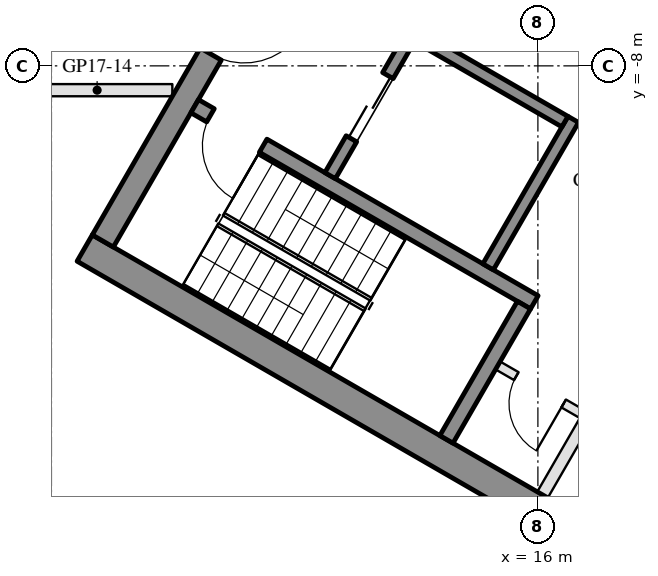
"""IFC4 building model, lengths in metres.
Left out: names, types, materials, properties, quantities, classifications, styles, units other than length and angle.
Written with IfcOpenShell. Run it as: python <this file> out.ifc"""

import sys

from ifc_helpers import new_model, si_unit, direction, frame, frame_2d, origin, place, context, subcontext, project, spatial, rectangle, extrude, element, fill, save


model = new_model("IFC4")
c1 = context("Model", 3, precision=1e-05, world=origin(), true_north=direction((0.0, 1.0)))
c2 = subcontext(c1, "Body", "Model", "MODEL_VIEW")
j1 = project(units=[si_unit("LENGTHUNIT", "METRE"), si_unit("PLANEANGLEUNIT", "RADIAN")], contexts=[c1])
p1 = place(None, origin())
s1 = spatial("IfcSite", under=j1, at=p1, CompositionType="ELEMENT")
p2 = place(p1, origin())
s2 = spatial("IfcBuilding", under=s1, at=p2, CompositionType="ELEMENT")
p3 = place(p2, frame((0.0, 0.0, 183.6)))
s3 = spatial("IfcBuildingStorey", under=s2, at=p3, CompositionType="ELEMENT", Elevation=183.6)
for number, where, z_axis, x_axis in (
    (1, (8.547, -10.997, 0.0), (0.0, 0.0, 1.0), (0.866, -0.5, 0.0)),
    (2, (13.797, -1.903, 0.0), (0.0, 0.0, 1.0), (0.866, -0.5, 0.0)),
):
    element("IfcWall", number, at=place(p3, frame(where, z_axis=z_axis, x_axis=x_axis)), inside=s3, PredefinedType="SHEAR", context=c2, shape_type="SweptSolid", body=[
        extrude(rectangle(XDim=14.837, YDim=0.5, at=frame_2d((7.418, 0.0))), origin(), (0.0, 0.0, 1.0), 3.5),
    ])
p4 = place(p3, frame((8.845, -10.88, 0.0), z_axis=(0.0, 0.0, 1.0), x_axis=(0.500004234368, 0.866022959057, 0.0)))
e3 = element("IfcWall", 3, at=p4, inside=s3, PredefinedType="SHEAR", context=c2, shape_type="SweptSolid", body=[
    extrude(rectangle(XDim=10.0, YDim=0.4, at=frame_2d((5.0, 0.0))), origin(), (0.0, 0.0, 1.0), 3.5),
])
p5 = place(p4, frame((3.55, 0.0, 0.0)))
e4 = element("IfcOpeningElement", 4, at=p5, cuts=e3, PredefinedType="OPENING", context=c2, shape_type="SweptSolid", body=[
    extrude(rectangle(XDim=1.1, YDim=2.1, at=frame_2d((0.55, 1.05))), frame((0.0, 0.21, 0.0), z_axis=(0.0, -1.0, 0.0), x_axis=(1.0, 0.0, 0.0)), (0.0, 0.0, 1.0), 0.42),
])
p6 = place(p4, frame((5.85, 0.0, 0.0)))
e5 = element("IfcOpeningElement", 5, at=p6, cuts=e3, PredefinedType="OPENING", context=c2, shape_type="SweptSolid", body=[
    extrude(rectangle(XDim=1.4, YDim=2.1, at=frame_2d((0.7, 1.05))), frame((0.0, 0.21, 0.0), z_axis=(0.0, -1.0, 0.0), x_axis=(1.0, 0.0, 0.0)), (0.0, 0.0, 1.0), 0.42),
])
p7 = place(p3, frame((10.356, -8.664, 0.0), z_axis=(0.0, 0.0, 1.0), x_axis=(0.866028629588, -0.499994412703, 0.0)))
e6 = element("IfcWall", 6, at=p7, inside=s3, PredefinedType="SHEAR", context=c2, shape_type="SweptSolid", body=[
    extrude(rectangle(XDim=6.45, YDim=0.25, at=frame_2d((3.225, 0.0))), origin(), (0.0, 0.0, 1.0), 3.5),
])
p8 = place(p7, frame((0.3, 0.0, 0.0)))
e7 = element("IfcOpeningElement", 7, at=p8, cuts=e6, PredefinedType="OPENING", context=c2, shape_type="SweptSolid", body=[
    extrude(rectangle(XDim=1.0, YDim=2.1, at=frame_2d((0.5, 1.05))), frame((0.0, 0.135, 0.0), z_axis=(0.0, -1.0, 0.0), x_axis=(1.0, 0.0, 0.0)), (0.0, 0.0, 1.0), 0.27),
])
p9 = place(p3, frame((14.496, -14.143, 0.0), z_axis=(0.0, 0.0, 1.0), x_axis=(0.500062241894, 0.865989465428, 0.0)))
e8 = element("IfcWall", 8, at=p9, inside=s3, PredefinedType="SHEAR", context=c2, shape_type="SweptSolid", body=[
    extrude(rectangle(XDim=2.55, YDim=0.25, at=frame_2d((1.275, 0.0))), origin(), (0.0, 0.0, 1.0), 3.5),
])
p10 = place(p3, frame((15.181, -11.305, 0.0), z_axis=(0.0, 0.0, 1.0), x_axis=(0.49994636267, 0.866056369097, 0.0)))
e9 = element("IfcWall", 9, at=p10, inside=s3, PredefinedType="SHEAR", context=c2, shape_type="SweptSolid", body=[
    extrude(rectangle(XDim=2.8, YDim=0.2, at=frame_2d((1.4, 0.0))), origin(), (0.0, 0.0, 1.0), 3.5),
])
p11 = place(p3, frame((12.583, -9.805, 0.0), z_axis=(0.0, 0.0, 1.0), x_axis=(0.49994636267, 0.866056369097, 0.0)))
e10 = element("IfcWall", 10, at=p11, inside=s3, PredefinedType="SHEAR", context=c2, shape_type="SweptSolid", body=[
    extrude(rectangle(XDim=2.8, YDim=0.2, at=frame_2d((1.4, 0.0))), origin(), (0.0, 0.0, 1.0), 3.5),
])
p12 = place(p11, frame((0.7, 0.0, 0.0)))
e11 = element("IfcOpeningElement", 11, at=p12, cuts=e10, PredefinedType="OPENING", context=c2, shape_type="SweptSolid", body=[
    extrude(rectangle(XDim=1.2, YDim=2.1, at=frame_2d((0.6, 1.05))), frame((0.0, 0.11, 0.0), z_axis=(0.0, -1.0, 0.0), x_axis=(1.0, 0.0, 0.0)), (0.0, 0.0, 1.0), 0.22),
])
p13 = place(p3, frame((14.02, -7.517, 0.0), z_axis=(0.0, 0.0, 1.0), x_axis=(0.866034573852, -0.49998411664, 0.0)))
e12 = element("IfcWall", 12, at=p13, inside=s3, PredefinedType="SHEAR", context=c2, shape_type="SweptSolid", body=[
    extrude(rectangle(XDim=2.8, YDim=0.2, at=frame_2d((1.4, 0.0))), origin(), (0.0, 0.0, 1.0), 3.5),
])
p14 = place(p3, frame((12.968, -4.138, 0.0), z_axis=(0.0, 0.0, 1.0), x_axis=(0.866028328073, -0.49999493495, 0.0)))
e13 = element("IfcWall", 13, at=p14, inside=s3, PredefinedType="SHEAR", context=c2, shape_type="SweptSolid", body=[
    extrude(rectangle(XDim=10.16, YDim=0.2, at=frame_2d((5.08, 0.0))), origin(), (0.0, 0.0, 1.0), 3.5),
])
p15 = place(p14, frame((4.53, 0.0, 0.0)))
e14 = element("IfcOpeningElement", 14, at=p15, cuts=e13, PredefinedType="OPENING", context=c2, shape_type="SweptSolid", body=[
    extrude(rectangle(XDim=0.9, YDim=2.1, at=frame_2d((0.45, 1.05))), frame((0.0, 0.11, 0.0), z_axis=(0.0, -1.0, 0.0), x_axis=(1.0, 0.0, 0.0)), (0.0, 0.0, 1.0), 0.22),
])
p16 = place(p3, frame((16.076, -15.055, 0.0), z_axis=(0.0, 0.0, 1.0), x_axis=(0.499995103361, 0.866028230842, 0.0)))
e15 = element("IfcWall", 15, at=p16, inside=s3, PredefinedType="PARTITIONING", context=c2, shape_type="SweptSolid", body=[
    extrude(rectangle(XDim=5.4, YDim=0.2, at=frame_2d((2.7, 0.0))), origin(), (0.0, 0.0, 1.0), 3.5),
])
p17 = place(p16, frame((3.05, 0.0, 0.0)))
e16 = element("IfcOpeningElement", 16, at=p17, cuts=e15, PredefinedType="OPENING", context=c2, shape_type="SweptSolid", body=[
    extrude(rectangle(XDim=0.9, YDim=2.1, at=frame_2d((0.45, 1.05))), frame((0.0, 0.11, 0.0), z_axis=(0.0, -1.0, 0.0), x_axis=(1.0, 0.0, 0.0)), (0.0, 0.0, 1.0), 0.22),
])
p18 = place(p3, frame((15.342, -12.928, 0.0), z_axis=(0.0, 0.0, 1.0), x_axis=(0.865989903783, -0.500061482766, 0.0)))
e17 = element("IfcWall", 17, at=p18, inside=s3, PredefinedType="PARTITIONING", context=c2, shape_type="SweptSolid", body=[
    extrude(rectangle(XDim=1.6, YDim=0.15, at=frame_2d((0.8, 0.0))), origin(), (0.0, 0.0, 1.0), 3.5),
])
p19 = place(p18, frame((0.35, 0.0, 0.0)))
e18 = element("IfcOpeningElement", 18, at=p19, cuts=e17, PredefinedType="OPENING", context=c2, shape_type="SweptSolid", body=[
    extrude(rectangle(XDim=0.9, YDim=2.1, at=frame_2d((0.45, 1.05))), frame((0.0, 0.085, 0.0), z_axis=(0.0, -1.0, 0.0), x_axis=(1.0, 0.0, 0.0)), (0.0, 0.0, 1.0), 0.17),
])
p20 = place(p3, frame((9.988, -8.4, 0.0), z_axis=(0.0, 0.0, 1.0), x_axis=(-1.0, 0.0, 0.0)))
e19 = element("IfcWall", 19, at=p20, inside=s3, PredefinedType="PARTITIONING", context=c2, shape_type="SweptSolid", body=[
    extrude(rectangle(XDim=6.185, YDim=0.2, at=frame_2d((3.092, 0.0))), origin(), (0.0, 0.0, 1.0), 2.95),
])
p21 = place(p20, frame((2.592, 0.0, 0.0)))
e20 = element("IfcOpeningElement", 20, at=p21, cuts=e19, PredefinedType="OPENING", context=c2, shape_type="SweptSolid", body=[
    extrude(rectangle(XDim=1.0, YDim=2.1, at=frame_2d((0.5, 1.05))), frame((0.0, 0.11, 0.0), z_axis=(0.0, -1.0, 0.0), x_axis=(1.0, 0.0, 0.0)), (0.0, 0.0, 1.0), 0.22),
])
p22 = place(p12, origin())
e21 = element("IfcDoor", 21, at=p22, inside=s3, OperationType="DOUBLE_DOOR_SLIDING", PredefinedType="DOOR", context=c2, shape_type="SweptSolid", body=[
    extrude(rectangle(XDim=1.2, YDim=2.1, at=frame_2d((0.6, 1.05))), frame((0.0, 0.025, 0.0), z_axis=(0.0, -1.0, 0.0), x_axis=(1.0, 0.0, 0.0)), (0.0, 0.0, 1.0), 0.05),
])
fill(e11, e21)
p23 = place(p19, frame((0.9, 0.0, 0.0), z_axis=(0.0, 0.0, 1.0), x_axis=(-1.0, 0.0, 0.0)))
e22 = element("IfcDoor", 22, at=p23, inside=s3, OperationType="SINGLE_SWING_LEFT", PredefinedType="DOOR", context=c2, shape_type="SweptSolid", body=[
    extrude(rectangle(XDim=0.9, YDim=2.1, at=frame_2d((0.45, 1.05))), frame((0.0, 0.025, 0.0), z_axis=(0.0, -1.0, 0.0), x_axis=(1.0, 0.0, 0.0)), (0.0, 0.0, 1.0), 0.05),
])
fill(e18, e22)
p24 = place(p5, frame((1.1, 0.0, 0.0), z_axis=(0.0, 0.0, 1.0), x_axis=(-1.0, 0.0, 0.0)))
e23 = element("IfcDoor", 23, at=p24, inside=s3, OperationType="SINGLE_SWING_LEFT", PredefinedType="DOOR", context=c2, shape_type="SweptSolid", body=[
    extrude(rectangle(XDim=1.1, YDim=2.1, at=frame_2d((0.55, 1.05))), frame((0.0, 0.025, 0.0), z_axis=(0.0, -1.0, 0.0), x_axis=(1.0, 0.0, 0.0)), (0.0, 0.0, 1.0), 0.05),
])
fill(e4, e23)
p25 = place(p8, frame((1.0, 0.0, 0.0), z_axis=(0.0, 0.0, 1.0), x_axis=(-1.0, 0.0, 0.0)))
e24 = element("IfcDoor", 24, at=p25, inside=s3, OperationType="SINGLE_SWING_LEFT", PredefinedType="DOOR", context=c2, shape_type="SweptSolid", body=[
    extrude(rectangle(XDim=1.0, YDim=2.1, at=frame_2d((0.5, 1.05))), frame((0.0, 0.025, 0.0), z_axis=(0.0, -1.0, 0.0), x_axis=(1.0, 0.0, 0.0)), (0.0, 0.0, 1.0), 0.05),
])
fill(e7, e24)
save(model, sys.argv[1])
